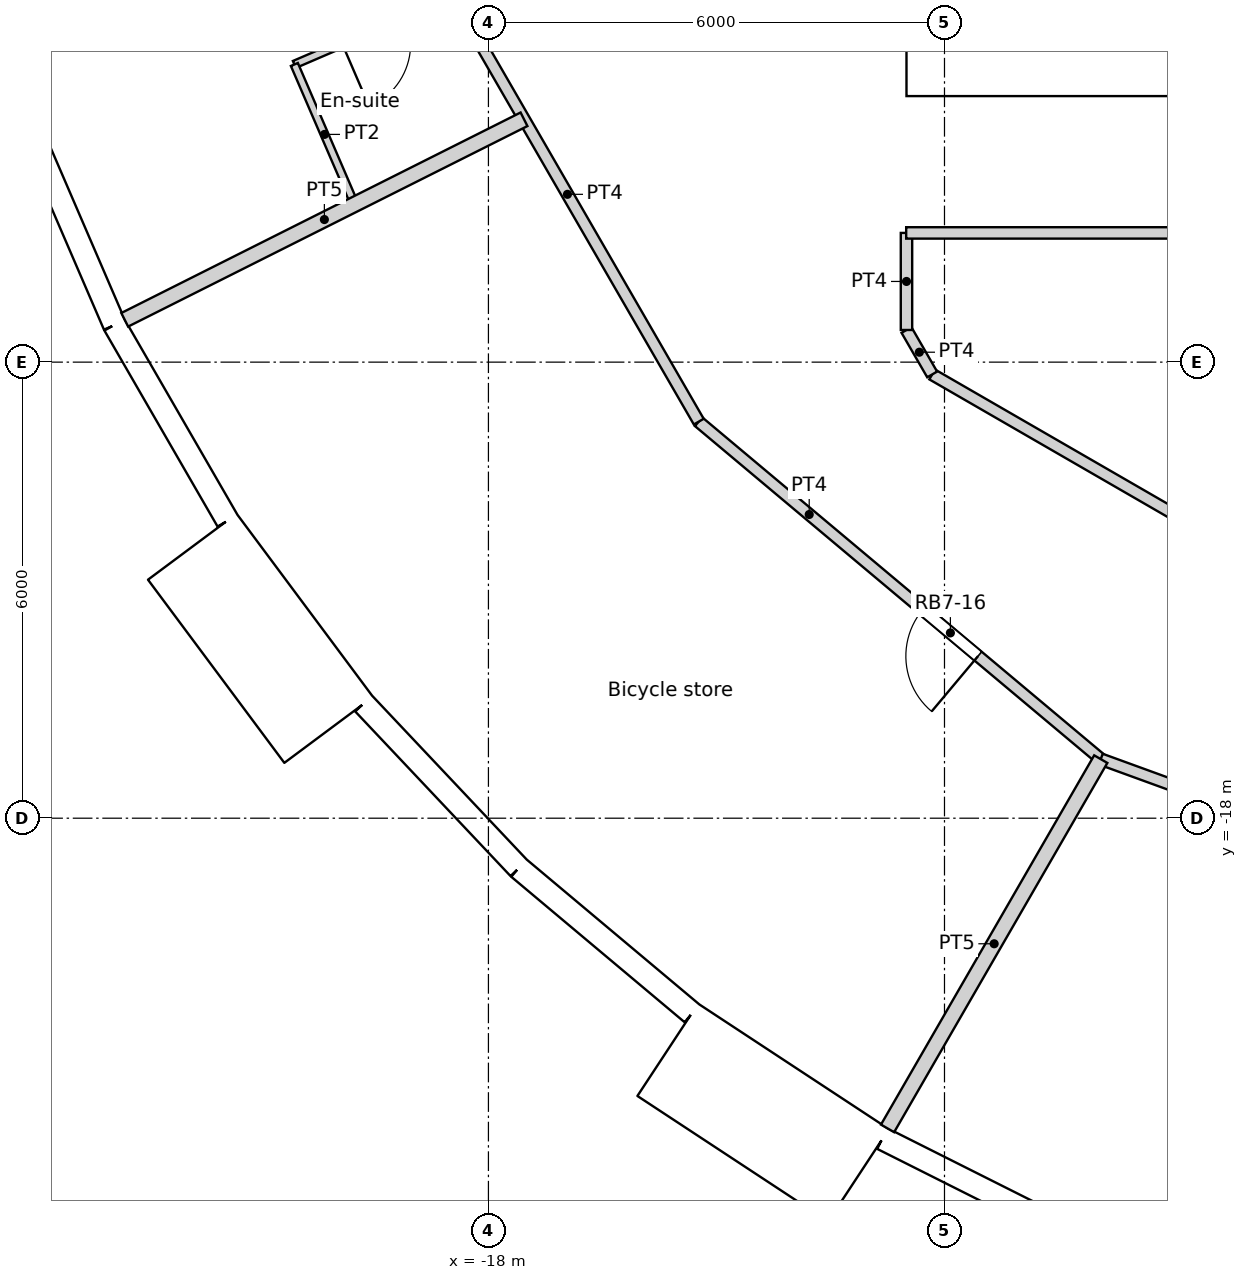
"""IFC4 building model, lengths in metres.
Left out: names, types, materials, properties, quantities, classifications, styles, units other than length and angle.
Written with IfcOpenShell. Run it as: python <this file> out.ifc"""

import sys

from ifc_helpers import new_model, si_unit, direction, frame, frame_2d, origin, origin_2d, place, context, subcontext, project, spatial, rectangle, circle, extrude, element, fill, save


model = new_model("IFC4")
c1 = context("Model", 3, precision=1e-05, world=origin(), true_north=direction((0.0, 1.0)))
c2 = subcontext(c1, "Body", "Model", "MODEL_VIEW")
j1 = project(units=[si_unit("LENGTHUNIT", "METRE"), si_unit("PLANEANGLEUNIT", "RADIAN")], contexts=[c1])
p1 = place(None, origin())
s1 = spatial("IfcSite", under=j1, at=p1, CompositionType="ELEMENT")
p2 = place(p1, origin())
s2 = spatial("IfcBuilding", under=s1, at=p2, CompositionType="ELEMENT")
p3 = place(p2, frame((0.0, 0.0, 190.8)))
s3 = spatial("IfcBuildingStorey", under=s2, at=p3, CompositionType="ELEMENT", Elevation=190.8)
for number, where, z_axis, x_axis in (
    (1, (-23.067, -8.396, 0.0), (0.0, 0.0, 1.0), (1.0, 0.0, 0.0)),
    (2, (-20.509, -13.489, 0.0), (0.0, 0.0, 1.0), (1.0, 0.0, 0.0)),
    (3, (-16.846, -17.855, 0.0), (0.0, 0.0, 1.0), (1.0, 0.0, 0.0)),
    (4, (-12.274, -21.259, 0.0), (0.0, 0.0, 1.0), (1.0, 0.0, 0.0)),
):
    element("IfcColumn", number, at=place(p3, frame(where, z_axis=z_axis, x_axis=x_axis)), inside=s3, PredefinedType="COLUMN", context=c2, shape_type="SweptSolid", body=[
        extrude(circle(Radius=0.6, at=origin_2d()), origin(), (0.0, 0.0, 1.0), 3.6),
    ])
for number, where, z_axis, x_axis in (
    (5, (-16.958, -8.167, 0.0), (0.0, 0.0, 1.0), (1.0, 0.0, 0.0)),
    (6, (-13.798, -12.802, 0.0), (0.0, 0.0, 1.0), (1.0, 0.0, 0.0)),
    (7, (-9.411, -16.301, 0.0), (0.0, 0.0, 1.0), (1.0, 0.0, 0.0)),
):
    element("IfcColumn", number, at=place(p3, frame(where, z_axis=z_axis, x_axis=x_axis)), inside=s3, PredefinedType="COLUMN", context=c2, shape_type="SweptSolid", body=[
        extrude(circle(Radius=0.65, at=origin_2d()), origin(), (0.0, 0.0, 1.0), 3.6),
    ])
p4 = place(p3, frame((-24.097, -8.781, 0.0), z_axis=(0.0, 0.0, 1.0), x_axis=(0.396078892785, -0.918216483565, 0.0)))
e8 = element("IfcWall", 8, at=p4, inside=s3, PredefinedType="SOLIDWALL", context=c2, shape_type="SweptSolid", body=[
    extrude(rectangle(XDim=2.973, YDim=0.3, at=frame_2d((1.486, 0.0))), origin(), (0.0, 0.0, 1.0), 2.8),
])
p5 = place(p4, frame((1.486, 0.0, 1.55)))
e9 = element("IfcOpeningElement", 9, at=p5, cuts=e8, PredefinedType="OPENING", context=c2, shape_type="SweptSolid", body=[
    extrude(circle(Radius=0.9, at=origin_2d()), frame((0.0, 0.16, 0.0), z_axis=(0.0, -1.0, 0.0), x_axis=(1.0, 0.0, 0.0)), (0.0, 0.0, 1.0), 0.32),
])
p6 = place(p3, frame((-22.919, -11.51, 0.0), z_axis=(0.0, 0.0, 1.0), x_axis=(0.500016263033, -0.866016014115, 0.0)))
e10 = element("IfcWall", 10, at=p6, inside=s3, PredefinedType="SOLIDWALL", context=c2, shape_type="SweptSolid", body=[
    extrude(rectangle(XDim=2.973, YDim=0.3, at=frame_2d((1.487, 0.0))), origin(), (0.0, 0.0, 1.0), 3.3),
])
p7 = place(p6, frame((1.486, 0.0, 1.55)))
e11 = element("IfcOpeningElement", 11, at=p7, cuts=e10, PredefinedType="OPENING", context=c2, shape_type="SweptSolid", body=[
    extrude(circle(Radius=0.9, at=origin_2d()), frame((0.0, 0.16, 0.0), z_axis=(0.0, -1.0, 0.0), x_axis=(1.0, 0.0, 0.0)), (0.0, 0.0, 1.0), 0.32),
])
p8 = place(p3, frame((-21.895, -14.43, -0.3), z_axis=(0.0, 0.0, 1.0), x_axis=(0.597183717734, -0.802104486506, 0.0)))
e12 = element("IfcWall", 12, at=p8, inside=s3, PredefinedType="ELEMENTEDWALL", context=c2, shape_type="SweptSolid", body=[
    extrude(rectangle(XDim=3.0, YDim=1.45, at=frame_2d((1.5, 0.0))), origin(), (0.0, 0.0, 1.0), 3.6),
])
p9 = place(p8, frame((1.5, 0.0, 1.85)))
e13 = element("IfcOpeningElement", 13, at=p9, cuts=e12, PredefinedType="OPENING", context=c2, shape_type="SweptSolid", body=[
    extrude(circle(Radius=0.9, at=origin_2d()), frame((0.0, 0.735, 0.0), z_axis=(0.0, -1.0, 0.0), x_axis=(1.0, 0.0, 0.0)), (0.0, 0.0, 1.0), 1.47),
])
p10 = place(p3, frame((-19.64, -16.493, 0.0), z_axis=(0.0, 0.0, 1.0), x_axis=(0.686235184166, -0.727379730273, 0.0)))
e14 = element("IfcWall", 14, at=p10, inside=s3, PredefinedType="SOLIDWALL", context=c2, shape_type="SweptSolid", body=[
    extrude(rectangle(XDim=2.973, YDim=0.3, at=frame_2d((1.486, 0.0))), origin(), (0.0, 0.0, 1.0), 2.8),
])
p11 = place(p10, frame((1.486, 0.0, 1.55)))
e15 = element("IfcOpeningElement", 15, at=p11, cuts=e14, PredefinedType="OPENING", context=c2, shape_type="SweptSolid", body=[
    extrude(circle(Radius=0.9, at=origin_2d()), frame((0.0, 0.16, 0.0), z_axis=(0.0, -1.0, 0.0), x_axis=(1.0, 0.0, 0.0)), (0.0, 0.0, 1.0), 0.32),
])
p12 = place(p3, frame((-17.6, -18.655, 0.0), z_axis=(0.0, 0.0, 1.0), x_axis=(0.766049350637, -0.642781761089, 0.0)))
e16 = element("IfcWall", 16, at=p12, inside=s3, PredefinedType="SOLIDWALL", context=c2, shape_type="SweptSolid", body=[
    extrude(rectangle(XDim=2.973, YDim=0.3, at=frame_2d((1.486, 0.0))), origin(), (0.0, 0.0, 1.0), 3.3),
])
p13 = place(p12, frame((1.486, 0.0, 1.55)))
e17 = element("IfcOpeningElement", 17, at=p13, cuts=e16, PredefinedType="OPENING", context=c2, shape_type="SweptSolid", body=[
    extrude(circle(Radius=0.9, at=origin_2d()), frame((0.0, 0.16, 0.0), z_axis=(0.0, -1.0, 0.0), x_axis=(1.0, 0.0, 0.0)), (0.0, 0.0, 1.0), 0.32),
])
p14 = place(p3, frame((-15.639, -21.048, -0.3), z_axis=(0.0, 0.0, 1.0), x_axis=(0.835514416706, -0.549468524554, 0.0)))
e18 = element("IfcWall", 18, at=p14, inside=s3, PredefinedType="ELEMENTEDWALL", context=c2, shape_type="SweptSolid", body=[
    extrude(rectangle(XDim=3.0, YDim=1.45, at=frame_2d((1.5, 0.0))), origin(), (0.0, 0.0, 1.0), 3.6),
])
p15 = place(p14, frame((1.5, 0.0, 1.85)))
e19 = element("IfcOpeningElement", 19, at=p15, cuts=e18, PredefinedType="OPENING", context=c2, shape_type="SweptSolid", body=[
    extrude(circle(Radius=0.9, at=origin_2d()), frame((0.0, 0.735, 0.0), z_axis=(0.0, -1.0, 0.0), x_axis=(1.0, 0.0, 0.0)), (0.0, 0.0, 1.0), 1.47),
])
p16 = place(p3, frame((-12.815, -22.216, 0.0), z_axis=(0.0, 0.0, 1.0), x_axis=(0.893637442555, -0.448789618045, 0.0)))
e20 = element("IfcWall", 20, at=p16, inside=s3, PredefinedType="SOLIDWALL", context=c2, shape_type="SweptSolid", body=[
    extrude(rectangle(XDim=2.973, YDim=0.3, at=frame_2d((1.486, 0.0))), origin(), (0.0, 0.0, 1.0), 2.8),
])
p17 = place(p16, frame((1.486, 0.0, 1.55)))
e21 = element("IfcOpeningElement", 21, at=p17, cuts=e20, PredefinedType="OPENING", context=c2, shape_type="SweptSolid", body=[
    extrude(circle(Radius=0.9, at=origin_2d()), frame((0.0, 0.16, 0.0), z_axis=(0.0, -1.0, 0.0), x_axis=(1.0, 0.0, 0.0)), (0.0, 0.0, 1.0), 0.32),
])
p18 = place(p3, frame((-12.5, -8.05, 0.0), z_axis=(0.0, 0.0, 1.0), x_axis=(1.0, 0.0, 0.0)))
e22 = element("IfcWall", 22, at=p18, inside=s3, PredefinedType="SOLIDWALL", context=c2, shape_type="SweptSolid", body=[
    extrude(rectangle(XDim=25.0, YDim=0.9, at=frame_2d((12.5, 0.0))), origin(), (0.0, 0.0, 1.0), 3.6),
])
p19 = place(p18, frame((13.4, 0.0, 0.0)))
e23 = element("IfcOpeningElement", 23, at=p19, cuts=e22, PredefinedType="OPENING", context=c2, shape_type="SweptSolid", body=[
    extrude(rectangle(XDim=1.0, YDim=2.1, at=frame_2d((0.5, 1.05))), frame((0.0, 0.45, 0.0), z_axis=(0.0, -1.0, 0.0), x_axis=(1.0, 0.0, 0.0)), (0.0, 0.0, 1.0), 0.9),
])
p20 = place(p18, frame((8.3, 0.0, 0.0)))
e24 = element("IfcOpeningElement", 24, at=p20, cuts=e22, PredefinedType="OPENING", context=c2, shape_type="SweptSolid", body=[
    extrude(rectangle(XDim=1.8, YDim=2.1, at=frame_2d((0.9, 1.05))), frame((0.0, 0.45, 0.0), z_axis=(0.0, -1.0, 0.0), x_axis=(1.0, 0.0, 0.0)), (0.0, 0.0, 1.0), 0.9),
])
p21 = place(p18, frame((14.9, 0.0, 0.0)))
e25 = element("IfcOpeningElement", 25, at=p21, cuts=e22, PredefinedType="OPENING", context=c2, shape_type="SweptSolid", body=[
    extrude(rectangle(XDim=1.8, YDim=2.1, at=frame_2d((0.9, 1.05))), frame((0.0, 0.45, 0.0), z_axis=(0.0, -1.0, 0.0), x_axis=(1.0, 0.0, 0.0)), (0.0, 0.0, 1.0), 0.9),
])
p22 = place(p3, frame((-12.504, -10.3, 0.0), z_axis=(0.0, 0.0, 1.0), x_axis=(1.0, 0.0, 0.0)))
e26 = element("IfcWall", 26, at=p22, inside=s3, PredefinedType="PARTITIONING", context=c2, shape_type="SweptSolid", body=[
    extrude(rectangle(XDim=7.687, YDim=0.15, at=frame_2d((3.844, 0.0))), origin(), (0.0, 0.0, 1.0), 3.3),
])
p23 = place(p3, frame((-12.5, -11.577, 0.0), z_axis=(0.0, 0.0, 1.0), x_axis=(0.0, 1.0, 0.0)))
e27 = element("IfcWall", 27, at=p23, inside=s3, PredefinedType="PARTITIONING", context=c2, shape_type="SweptSolid", body=[
    extrude(rectangle(XDim=1.277, YDim=0.15, at=frame_2d((0.638, 0.0))), origin(), (0.0, 0.0, 1.0), 3.3),
])
p24 = place(p3, frame((-12.5, -11.577, 0.0), z_axis=(0.0, 0.0, 1.0), x_axis=(0.500024767483, -0.866011103799, 0.0)))
e28 = element("IfcWall", 28, at=p24, inside=s3, PredefinedType="PARTITIONING", context=c2, shape_type="SweptSolid", body=[
    extrude(rectangle(XDim=0.676, YDim=0.15, at=frame_2d((0.338, 0.0))), origin(), (0.0, 0.0, 1.0), 3.3),
])
p25 = place(p3, frame((-18.688, -6.802, 0.0), z_axis=(0.0, 0.0, 1.0), x_axis=(0.500229307554, -0.865892972523, 0.0)))
e29 = element("IfcWall", 29, at=p25, inside=s3, PredefinedType="PARTITIONING", context=c2, shape_type="SweptSolid", body=[
    extrude(rectangle(XDim=6.907, YDim=0.15, at=frame_2d((3.454, 0.0))), origin(), (0.0, 0.0, 1.0), 3.3),
])
p26 = place(p3, frame((-15.235, -12.784, 0.0), z_axis=(0.0, 0.0, 1.0), x_axis=(0.766192104565, -0.642611592567, 0.0)))
e30 = element("IfcWall", 30, at=p26, inside=s3, PredefinedType="PARTITIONING", context=c2, shape_type="SweptSolid", body=[
    extrude(rectangle(XDim=6.906, YDim=0.15, at=frame_2d((3.453, 0.0))), origin(), (0.0, 0.0, 1.0), 3.3),
])
p27 = place(p26, frame((3.848, 0.0, 0.0)))
e31 = element("IfcOpeningElement", 31, at=p27, cuts=e30, PredefinedType="OPENING", context=c2, shape_type="SweptSolid", body=[
    extrude(rectangle(XDim=0.95, YDim=2.1, at=frame_2d((0.475, 1.05))), frame((0.0, 0.075, 0.0), z_axis=(0.0, -1.0, 0.0), x_axis=(1.0, 0.0, 0.0)), (0.0, 0.0, 1.0), 0.15),
])
p28 = place(p3, frame((-12.162, -12.162, 0.0), z_axis=(0.0, 0.0, 1.0), x_axis=(0.866004766557, -0.500035743023, 0.0)))
e32 = element("IfcWall", 32, at=p28, inside=s3, PredefinedType="PARTITIONING", context=c2, shape_type="SweptSolid", body=[
    extrude(rectangle(XDim=8.477, YDim=0.15, at=frame_2d((4.239, 0.0))), origin(), (0.0, 0.0, 1.0), 3.3),
])
p29 = place(p28, frame((3.738, 0.0, 0.0)))
e33 = element("IfcOpeningElement", 33, at=p29, cuts=e32, PredefinedType="OPENING", context=c2, shape_type="SweptSolid", body=[
    extrude(rectangle(XDim=1.0, YDim=2.04, at=frame_2d((0.5, 1.02))), frame((0.0, 0.075, 0.0), z_axis=(0.0, -1.0, 0.0), x_axis=(1.0, 0.0, 0.0)), (0.0, 0.0, 1.0), 0.15),
])
p30 = place(p3, frame((-9.944, -17.223, 0.0), z_axis=(0.0, 0.0, 1.0), x_axis=(0.939672634566, -0.342075050021, 0.0)))
e34 = element("IfcWall", 34, at=p30, inside=s3, PredefinedType="PARTITIONING", context=c2, shape_type="SweptSolid", body=[
    extrude(rectangle(XDim=6.908, YDim=0.15, at=frame_2d((3.454, 0.0))), origin(), (0.0, 0.0, 1.0), 3.3),
])
p31 = place(p30, frame((2.704, 0.0, 0.0)))
e35 = element("IfcOpeningElement", 35, at=p31, cuts=e34, PredefinedType="OPENING", context=c2, shape_type="SweptSolid", body=[
    extrude(rectangle(XDim=1.5, YDim=2.1, at=frame_2d((0.75, 1.05))), frame((0.0, 0.075, 0.0), z_axis=(0.0, -1.0, 0.0), x_axis=(1.0, 0.0, 0.0)), (0.0, 0.0, 1.0), 0.15),
])
p32 = place(p3, frame((-20.553, -8.084, 0.0), z_axis=(0.0, 0.0, 1.0), x_axis=(0.918353723737, 0.395760581789, 0.0)))
e36 = element("IfcWall", 36, at=p32, inside=s3, PredefinedType="PARTITIONING", context=c2, shape_type="SweptSolid", body=[
    extrude(rectangle(XDim=2.271, YDim=0.1, at=frame_2d((1.136, 0.0))), origin(), (0.0, 0.0, 1.0), 3.3),
])
p33 = place(p32, frame((0.686, 0.0, 0.0)))
e37 = element("IfcOpeningElement", 37, at=p33, cuts=e36, PredefinedType="OPENING", context=c2, shape_type="SweptSolid", body=[
    extrude(rectangle(XDim=0.9, YDim=2.04, at=frame_2d((0.45, 1.02))), frame((0.0, 0.05, 0.0), z_axis=(0.0, -1.0, 0.0), x_axis=(1.0, 0.0, 0.0)), (0.0, 0.0, 1.0), 0.1),
])
p34 = place(p3, frame((-20.553, -8.084, 0.0), z_axis=(0.0, 0.0, 1.0), x_axis=(0.395756708969, -0.918355392703, 0.0)))
e38 = element("IfcWall", 38, at=p34, inside=s3, PredefinedType="PARTITIONING", context=c2, shape_type="SweptSolid", body=[
    extrude(rectangle(XDim=2.004, YDim=0.1, at=frame_2d((1.002, 0.0))), origin(), (0.0, 0.0, 1.0), 3.3),
])
p35 = place(p3, frame((-22.785, -11.443, 0.0), z_axis=(0.0, 0.0, 1.0), x_axis=(0.893644988933, 0.448774591254, 0.0)))
e39 = element("IfcWall", 39, at=p35, inside=s3, PredefinedType="PARTITIONING", context=c2, shape_type="SweptSolid", body=[
    extrude(rectangle(XDim=5.878, YDim=0.2, at=frame_2d((2.939, 0.0))), origin(), (0.0, 0.0, 1.0), 3.3),
])
p36 = place(p3, frame((-12.749, -22.081, 0.0), z_axis=(0.0, 0.0, 1.0), x_axis=(0.500010020406, 0.866019618423, 0.0)))
e40 = element("IfcWall", 40, at=p36, inside=s3, PredefinedType="PARTITIONING", context=c2, shape_type="SweptSolid", body=[
    extrude(rectangle(XDim=5.61, YDim=0.2, at=frame_2d((2.805, 0.0))), origin(), (0.0, 0.0, 1.0), 3.3),
])
p37 = place(p5, origin())
e41 = element("IfcWindow", 41, at=p37, inside=s3, PartitioningType="SINGLE_PANEL", PredefinedType="WINDOW", context=c2, shape_type="SweptSolid", body=[
    extrude(circle(Radius=0.9, at=origin_2d()), frame((0.0, 0.12, 0.0), z_axis=(0.0, -1.0, 0.0), x_axis=(1.0, 0.0, 0.0)), (0.0, 0.0, 1.0), 0.1),
])
fill(e9, e41)
p38 = place(p7, origin())
e42 = element("IfcWindow", 42, at=p38, inside=s3, PartitioningType="SINGLE_PANEL", PredefinedType="WINDOW", context=c2, shape_type="SweptSolid", body=[
    extrude(circle(Radius=0.9, at=origin_2d()), frame((0.0, 0.12, 0.0), z_axis=(0.0, -1.0, 0.0), x_axis=(1.0, 0.0, 0.0)), (0.0, 0.0, 1.0), 0.1),
])
fill(e11, e42)
p39 = place(p9, origin())
e43 = element("IfcWindow", 43, at=p39, inside=s3, PartitioningType="SINGLE_PANEL", PredefinedType="WINDOW", context=c2, shape_type="SweptSolid", body=[
    extrude(circle(Radius=0.9, at=origin_2d()), frame((0.0, 0.695, 0.0), z_axis=(0.0, -1.0, 0.0), x_axis=(1.0, 0.0, 0.0)), (0.0, 0.0, 1.0), 0.1),
])
fill(e13, e43)
p40 = place(p11, origin())
e44 = element("IfcWindow", 44, at=p40, inside=s3, PartitioningType="SINGLE_PANEL", PredefinedType="WINDOW", context=c2, shape_type="SweptSolid", body=[
    extrude(circle(Radius=0.9, at=origin_2d()), frame((0.0, 0.12, 0.0), z_axis=(0.0, -1.0, 0.0), x_axis=(1.0, 0.0, 0.0)), (0.0, 0.0, 1.0), 0.1),
])
fill(e15, e44)
p41 = place(p13, origin())
e45 = element("IfcWindow", 45, at=p41, inside=s3, PartitioningType="SINGLE_PANEL", PredefinedType="WINDOW", context=c2, shape_type="SweptSolid", body=[
    extrude(circle(Radius=0.9, at=origin_2d()), frame((0.0, 0.12, 0.0), z_axis=(0.0, -1.0, 0.0), x_axis=(1.0, 0.0, 0.0)), (0.0, 0.0, 1.0), 0.1),
])
fill(e17, e45)
p42 = place(p15, origin())
e46 = element("IfcWindow", 46, at=p42, inside=s3, PartitioningType="SINGLE_PANEL", PredefinedType="WINDOW", context=c2, shape_type="SweptSolid", body=[
    extrude(circle(Radius=0.9, at=origin_2d()), frame((0.0, 0.695, 0.0), z_axis=(0.0, -1.0, 0.0), x_axis=(1.0, 0.0, 0.0)), (0.0, 0.0, 1.0), 0.1),
])
fill(e19, e46)
p43 = place(p17, origin())
e47 = element("IfcWindow", 47, at=p43, inside=s3, PartitioningType="SINGLE_PANEL", PredefinedType="WINDOW", context=c2, shape_type="SweptSolid", body=[
    extrude(circle(Radius=0.9, at=origin_2d()), frame((0.0, 0.12, 0.0), z_axis=(0.0, -1.0, 0.0), x_axis=(1.0, 0.0, 0.0)), (0.0, 0.0, 1.0), 0.1),
])
fill(e21, e47)
p44 = place(p27, origin())
e48 = element("IfcDoor", 48, at=p44, inside=s3, OperationType="SINGLE_SWING_LEFT", PredefinedType="DOOR", context=c2, shape_type="SweptSolid", body=[
    extrude(rectangle(XDim=0.95, YDim=2.1, at=frame_2d((0.475, 1.05))), frame((0.0, 0.025, 0.0), z_axis=(0.0, -1.0, 0.0), x_axis=(1.0, 0.0, 0.0)), (0.0, 0.0, 1.0), 0.05),
])
fill(e31, e48)
save(model, sys.argv[1])
